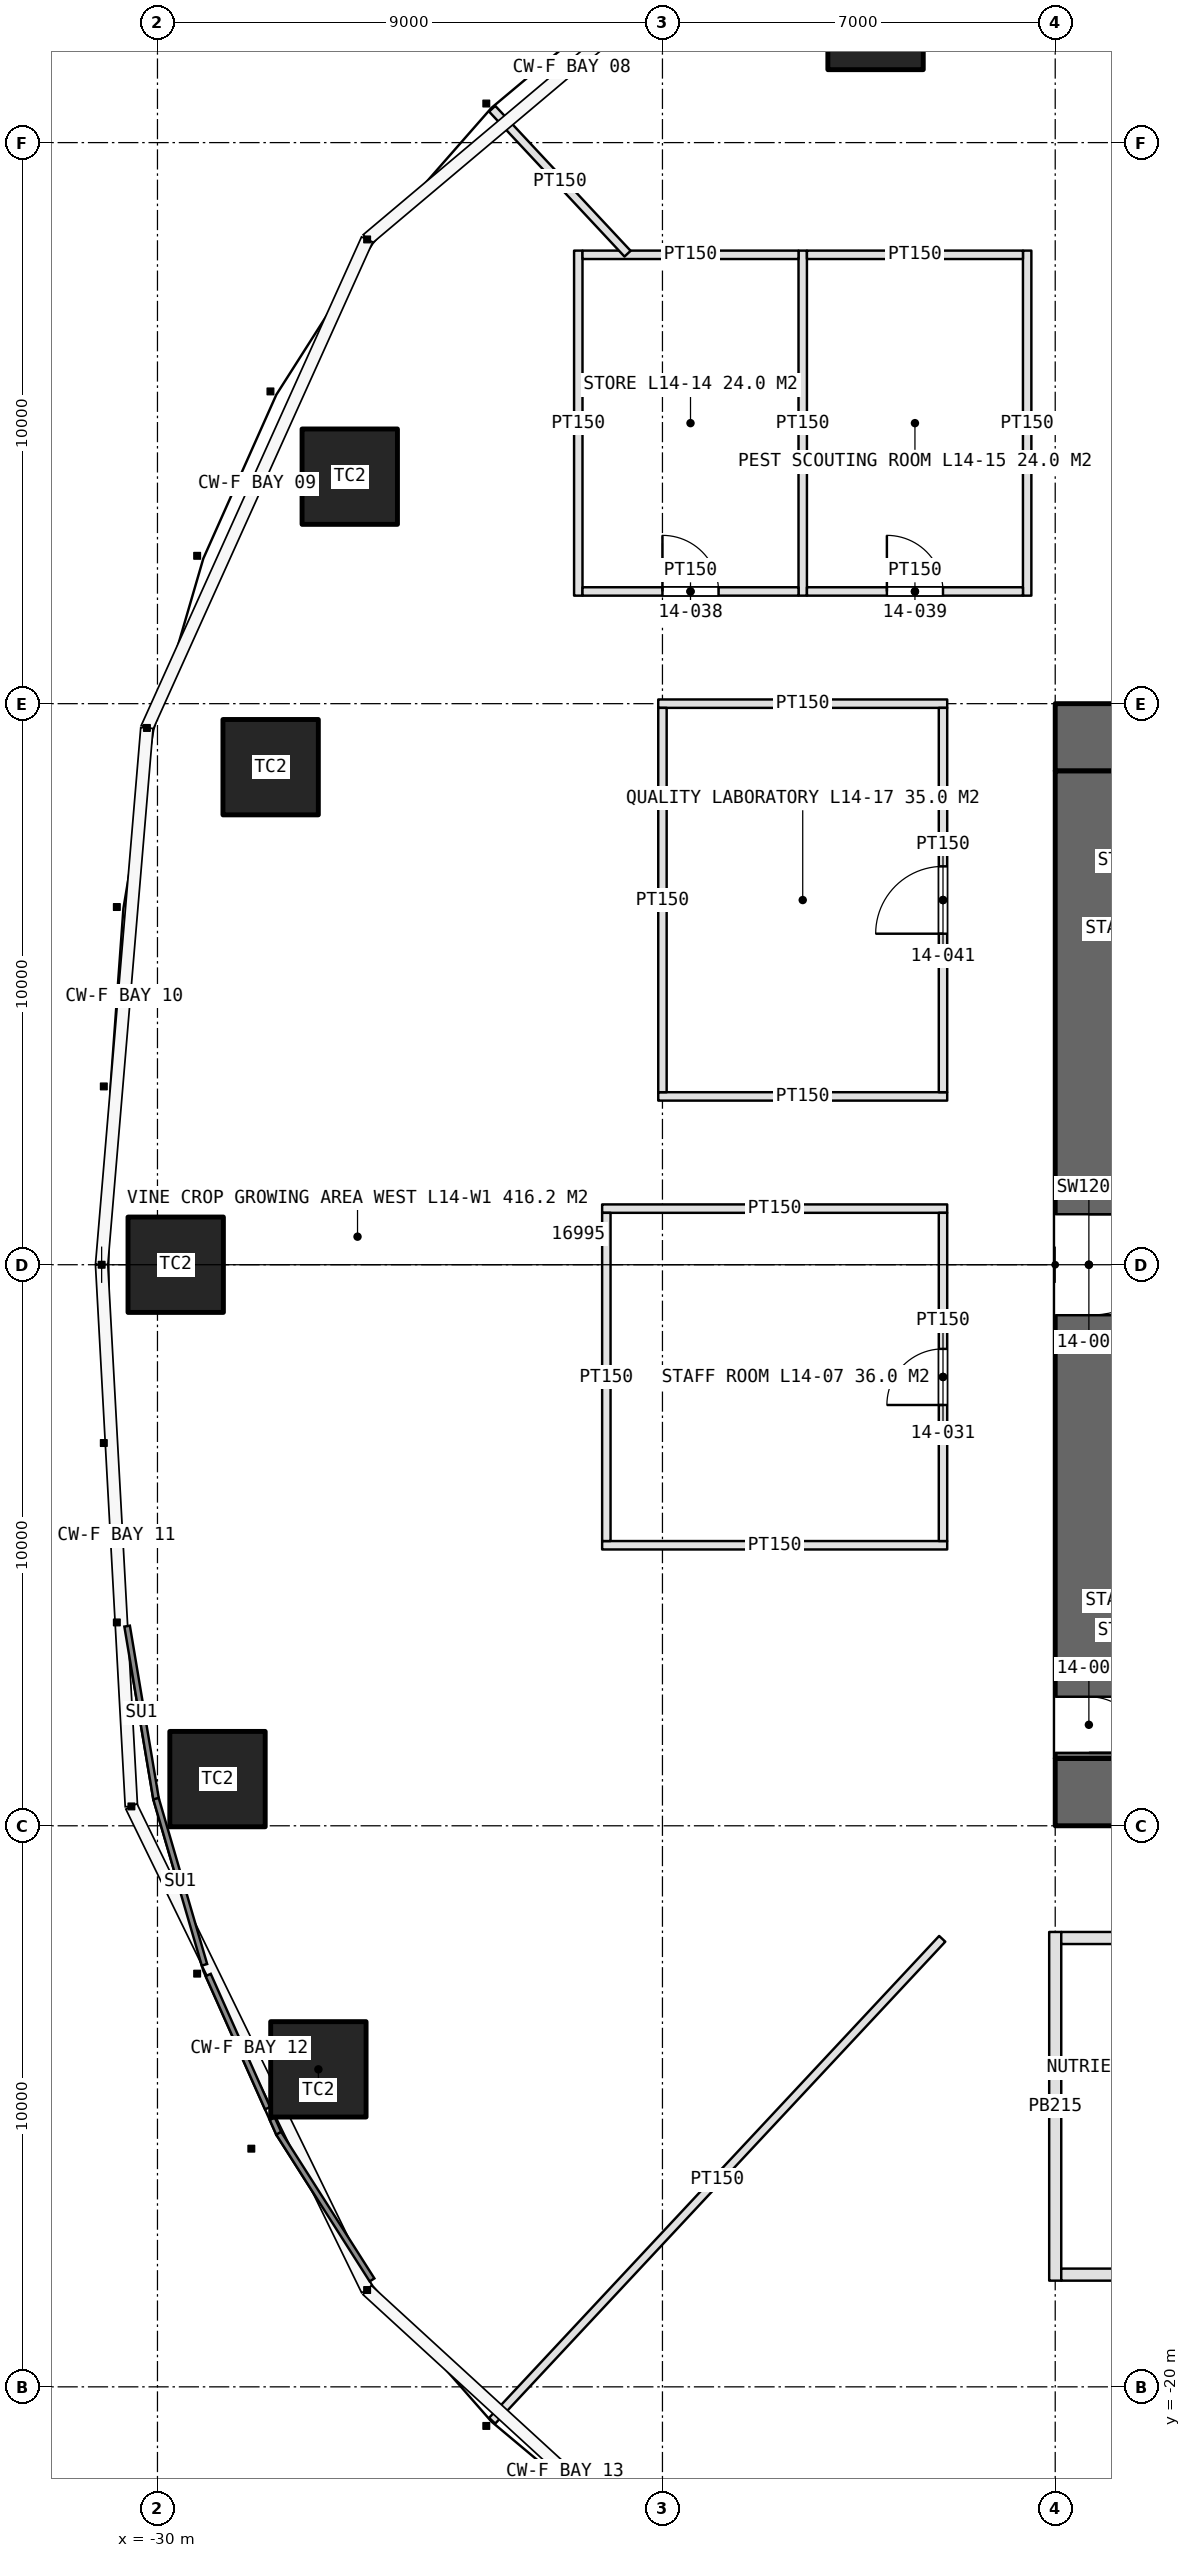
"""IFC4 building model, lengths in metres.
Left out: names, types, materials, properties, quantities, classifications, styles, units other than length and angle.
Written with IfcOpenShell. Run it as: python <this file> out.ifc"""

import sys

from ifc_helpers import new_model, si_unit, direction, frame, frame_2d, origin, origin_2d, place, context, subcontext, project, spatial, rectangle, extrude, element, fill, save


model = new_model("IFC4")
c1 = context("Model", 3, precision=1e-05, world=origin(), true_north=direction((0.0, 1.0)))
c2 = subcontext(c1, "Body", "Model", "MODEL_VIEW")
j1 = project(units=[si_unit("LENGTHUNIT", "METRE"), si_unit("PLANEANGLEUNIT", "RADIAN")], contexts=[c1])
p1 = place(None, origin())
s1 = spatial("IfcSite", under=j1, at=p1, CompositionType="ELEMENT")
p2 = place(p1, origin())
s2 = spatial("IfcBuilding", under=s1, at=p2, CompositionType="ELEMENT")
p3 = place(p2, frame((0.0, 0.0, 70.0)))
s3 = spatial("IfcBuildingStorey", under=s2, at=p3, CompositionType="ELEMENT", Elevation=70.0)
p4 = place(p3, frame((-14.0, -9.4, 0.0), z_axis=(0.0, 0.0, 1.0), x_axis=(1.0, 0.0, 0.0)))
e1 = element("IfcWall", 1, at=p4, inside=s3, PredefinedType="SHEAR", context=c2, shape_type="SweptSolid", body=[
    extrude(rectangle(XDim=28.0, YDim=1.2, at=frame_2d((14.0, 0.0))), origin(), (0.0, 0.0, 1.0), 5.0),
])
p5 = place(p4, frame((13.1, 0.0, 0.0)))
e2 = element("IfcOpeningElement", 2, at=p5, cuts=e1, PredefinedType="OPENING", context=c2, shape_type="SweptSolid", body=[
    extrude(rectangle(XDim=1.8, YDim=2.4, at=frame_2d((0.9, 1.2))), frame((0.0, 0.61, 0.0), z_axis=(0.0, -1.0, 0.0), x_axis=(1.0, 0.0, 0.0)), (0.0, 0.0, 1.0), 1.22),
])
p6 = place(p4, frame((22.9, 0.0, 0.0)))
e3 = element("IfcOpeningElement", 3, at=p6, cuts=e1, PredefinedType="OPENING", context=c2, shape_type="SweptSolid", body=[
    extrude(rectangle(XDim=2.2, YDim=2.7, at=frame_2d((1.1, 1.35))), frame((0.0, 0.61, 0.0), z_axis=(0.0, -1.0, 0.0), x_axis=(1.0, 0.0, 0.0)), (0.0, 0.0, 1.0), 1.22),
])
p7 = place(p3, frame((14.0, 9.4, 0.0), z_axis=(0.0, 0.0, 1.0), x_axis=(-1.0, 0.0, 0.0)))
e4 = element("IfcWall", 4, at=p7, inside=s3, PredefinedType="SHEAR", context=c2, shape_type="SweptSolid", body=[
    extrude(rectangle(XDim=28.0, YDim=1.2, at=frame_2d((14.0, 0.0))), origin(), (0.0, 0.0, 1.0), 5.0),
])
p8 = place(p7, frame((24.0, 0.0, 0.0)))
e5 = element("IfcOpeningElement", 5, at=p8, cuts=e4, PredefinedType="OPENING", context=c2, shape_type="SweptSolid", body=[
    extrude(rectangle(XDim=1.0, YDim=2.4, at=frame_2d((0.5, 1.2))), frame((0.0, 0.61, 0.0), z_axis=(0.0, -1.0, 0.0), x_axis=(1.0, 0.0, 0.0)), (0.0, 0.0, 1.0), 1.22),
])
p9 = place(p7, frame((13.1, 0.0, 0.0)))
e6 = element("IfcOpeningElement", 6, at=p9, cuts=e4, PredefinedType="OPENING", context=c2, shape_type="SweptSolid", body=[
    extrude(rectangle(XDim=1.8, YDim=2.4, at=frame_2d((0.9, 1.2))), frame((0.0, 0.61, 0.0), z_axis=(0.0, -1.0, 0.0), x_axis=(1.0, 0.0, 0.0)), (0.0, 0.0, 1.0), 1.22),
])
p10 = place(p3, frame((-13.4, 8.8, 0.0), z_axis=(0.0, 0.0, 1.0), x_axis=(0.0, -1.0, 0.0)))
e7 = element("IfcWall", 7, at=p10, inside=s3, PredefinedType="SHEAR", context=c2, shape_type="SweptSolid", body=[
    extrude(rectangle(XDim=17.6, YDim=1.2, at=frame_2d((8.8, 0.0))), origin(), (0.0, 0.0, 1.0), 5.0),
])
p11 = place(p10, frame((7.9, 0.0, 0.0)))
e8 = element("IfcOpeningElement", 8, at=p11, cuts=e7, PredefinedType="OPENING", context=c2, shape_type="SweptSolid", body=[
    extrude(rectangle(XDim=1.8, YDim=2.4, at=frame_2d((0.9, 1.2))), frame((0.0, 0.61, 0.0), z_axis=(0.0, -1.0, 0.0), x_axis=(1.0, 0.0, 0.0)), (0.0, 0.0, 1.0), 1.22),
])
p12 = place(p10, frame((16.5, 0.0, 0.0)))
e9 = element("IfcOpeningElement", 9, at=p12, cuts=e7, PredefinedType="OPENING", context=c2, shape_type="SweptSolid", body=[
    extrude(rectangle(XDim=1.0, YDim=2.4, at=frame_2d((0.5, 1.2))), frame((0.0, 0.61, 0.0), z_axis=(0.0, -1.0, 0.0), x_axis=(1.0, 0.0, 0.0)), (0.0, 0.0, 1.0), 1.22),
])
for number, where, z_axis, x_axis in (
    (10, (-17.202, 22.15, 0.0), (0.0, 0.0, 1.0), (1.0, 0.0, 0.0)),
    (11, (-26.573, 14.046, 0.0), (0.0, 0.0, 1.0), (1.0, 0.0, 0.0)),
    (12, (-27.983, 8.868, 0.0), (0.0, 0.0, 1.0), (1.0, 0.0, 0.0)),
    (13, (-29.675, 0.0, 0.0), (0.0, 0.0, 1.0), (1.0, 0.0, 0.0)),
    (14, (-28.93, -9.168, 0.0), (0.0, 0.0, 1.0), (1.0, 0.0, 0.0)),
    (15, (-27.132, -14.341, 0.0), (0.0, 0.0, 1.0), (1.0, 0.0, 0.0)),
):
    element("IfcColumn", number, at=place(p3, frame(where, z_axis=z_axis, x_axis=x_axis)), inside=s3, PredefinedType="COLUMN", context=c2, shape_type="SweptSolid", body=[
        extrude(rectangle(XDim=1.7, YDim=1.7, at=origin_2d()), origin(), (0.0, 0.0, 1.0), 5.0),
    ])
p13 = place(p3, frame((-14.0, -11.893, 0.0), z_axis=(0.0, 0.0, 1.0), x_axis=(0.0, -1.0, 0.0)))
e16 = element("IfcWall", 16, at=p13, inside=s3, PredefinedType="PARTITIONING", context=c2, shape_type="SweptSolid", body=[
    extrude(rectangle(XDim=6.215, YDim=0.215, at=frame_2d((3.107, 0.0))), origin(), (0.0, 0.0, 1.0), 3.6),
])
p14 = place(p3, frame((-13.893, -12.0, 0.0), z_axis=(0.0, 0.0, 1.0), x_axis=(1.0, 0.0, 0.0)))
e17 = element("IfcWall", 17, at=p14, inside=s3, PredefinedType="PARTITIONING", context=c2, shape_type="SweptSolid", body=[
    extrude(rectangle(XDim=5.785, YDim=0.215, at=frame_2d((2.893, 0.0))), origin(), (0.0, 0.0, 1.0), 3.6),
])
p15 = place(p14, frame((1.692, 0.0, 0.0)))
e18 = element("IfcOpeningElement", 18, at=p15, cuts=e17, PredefinedType="OPENING", context=c2, shape_type="SweptSolid", body=[
    extrude(rectangle(XDim=2.4, YDim=2.4, at=frame_2d((1.2, 1.2))), frame((0.0, 0.118, 0.0), z_axis=(0.0, -1.0, 0.0), x_axis=(1.0, 0.0, 0.0)), (0.0, 0.0, 1.0), 0.235),
])
p16 = place(p3, frame((-13.893, -18.0, 0.0), z_axis=(0.0, 0.0, 1.0), x_axis=(1.0, 0.0, 0.0)))
e19 = element("IfcWall", 19, at=p16, inside=s3, PredefinedType="PARTITIONING", context=c2, shape_type="SweptSolid", body=[
    extrude(rectangle(XDim=5.785, YDim=0.215, at=frame_2d((2.893, 0.0))), origin(), (0.0, 0.0, 1.0), 3.6),
])
for number, where, z_axis, x_axis in (
    (20, (-15.925, -5.0, 0.0), (0.0, 0.0, 1.0), (-1.0, 0.0, 0.0)),
    (21, (-15.925, 1.0, 0.0), (0.0, 0.0, 1.0), (-1.0, 0.0, 0.0)),
):
    element("IfcWall", number, at=place(p3, frame(where, z_axis=z_axis, x_axis=x_axis)), inside=s3, PredefinedType="PARTITIONING", context=c2, shape_type="SweptSolid", body=[
        extrude(rectangle(XDim=6.15, YDim=0.15, at=frame_2d((3.075, 0.0))), origin(), (0.0, 0.0, 1.0), 3.6),
    ])
p17 = place(p3, frame((-16.0, -4.925, 0.0), z_axis=(0.0, 0.0, 1.0), x_axis=(0.0, 1.0, 0.0)))
e22 = element("IfcWall", 22, at=p17, inside=s3, PredefinedType="PARTITIONING", context=c2, shape_type="SweptSolid", body=[
    extrude(rectangle(XDim=5.85, YDim=0.15, at=frame_2d((2.925, 0.0))), origin(), (0.0, 0.0, 1.0), 3.6),
])
p18 = place(p17, frame((2.425, 0.0, 0.0)))
e23 = element("IfcOpeningElement", 23, at=p18, cuts=e22, PredefinedType="OPENING", context=c2, shape_type="SweptSolid", body=[
    extrude(rectangle(XDim=1.0, YDim=2.2, at=frame_2d((0.5, 1.1))), frame((0.0, 0.085, 0.0), z_axis=(0.0, -1.0, 0.0), x_axis=(1.0, 0.0, 0.0)), (0.0, 0.0, 1.0), 0.17),
])
p19 = place(p3, frame((-22.0, -4.925, 0.0), z_axis=(0.0, 0.0, 1.0), x_axis=(0.0, 1.0, 0.0)))
e24 = element("IfcWall", 24, at=p19, inside=s3, PredefinedType="PARTITIONING", context=c2, shape_type="SweptSolid", body=[
    extrude(rectangle(XDim=5.85, YDim=0.15, at=frame_2d((2.925, 0.0))), origin(), (0.0, 0.0, 1.0), 3.6),
])
for number, where, z_axis, x_axis in (
    (25, (-22.5, 11.925, 0.0), (0.0, 0.0, 1.0), (0.0, 1.0, 0.0)),
    (26, (-18.5, 11.925, 0.0), (0.0, 0.0, 1.0), (0.0, 1.0, 0.0)),
    (27, (-14.5, 11.925, 0.0), (0.0, 0.0, 1.0), (0.0, 1.0, 0.0)),
):
    element("IfcWall", number, at=place(p3, frame(where, z_axis=z_axis, x_axis=x_axis)), inside=s3, PredefinedType="PARTITIONING", context=c2, shape_type="SweptSolid", body=[
        extrude(rectangle(XDim=6.15, YDim=0.15, at=frame_2d((3.075, 0.0))), origin(), (0.0, 0.0, 1.0), 3.6),
    ])
p20 = place(p3, frame((-22.425, 12.0, 0.0), z_axis=(0.0, 0.0, 1.0), x_axis=(1.0, 0.0, 0.0)))
e28 = element("IfcWall", 28, at=p20, inside=s3, PredefinedType="PARTITIONING", context=c2, shape_type="SweptSolid", body=[
    extrude(rectangle(XDim=3.85, YDim=0.15, at=frame_2d((1.925, 0.0))), origin(), (0.0, 0.0, 1.0), 3.6),
])
p21 = place(p20, frame((1.425, 0.0, 0.0)))
e29 = element("IfcOpeningElement", 29, at=p21, cuts=e28, PredefinedType="OPENING", context=c2, shape_type="SweptSolid", body=[
    extrude(rectangle(XDim=1.0, YDim=2.2, at=frame_2d((0.5, 1.1))), frame((0.0, 0.085, 0.0), z_axis=(0.0, -1.0, 0.0), x_axis=(1.0, 0.0, 0.0)), (0.0, 0.0, 1.0), 0.17),
])
p22 = place(p3, frame((-22.425, 18.0, 0.0), z_axis=(0.0, 0.0, 1.0), x_axis=(1.0, 0.0, 0.0)))
e30 = element("IfcWall", 30, at=p22, inside=s3, PredefinedType="PARTITIONING", context=c2, shape_type="SweptSolid", body=[
    extrude(rectangle(XDim=3.85, YDim=0.15, at=frame_2d((1.925, 0.0))), origin(), (0.0, 0.0, 1.0), 3.6),
])
p23 = place(p3, frame((-18.425, 12.0, 0.0), z_axis=(0.0, 0.0, 1.0), x_axis=(1.0, 0.0, 0.0)))
e31 = element("IfcWall", 31, at=p23, inside=s3, PredefinedType="PARTITIONING", context=c2, shape_type="SweptSolid", body=[
    extrude(rectangle(XDim=3.85, YDim=0.15, at=frame_2d((1.925, 0.0))), origin(), (0.0, 0.0, 1.0), 3.6),
])
p24 = place(p23, frame((1.425, 0.0, 0.0)))
e32 = element("IfcOpeningElement", 32, at=p24, cuts=e31, PredefinedType="OPENING", context=c2, shape_type="SweptSolid", body=[
    extrude(rectangle(XDim=1.0, YDim=2.2, at=frame_2d((0.5, 1.1))), frame((0.0, 0.085, 0.0), z_axis=(0.0, -1.0, 0.0), x_axis=(1.0, 0.0, 0.0)), (0.0, 0.0, 1.0), 0.17),
])
p25 = place(p3, frame((-18.425, 18.0, 0.0), z_axis=(0.0, 0.0, 1.0), x_axis=(1.0, 0.0, 0.0)))
e33 = element("IfcWall", 33, at=p25, inside=s3, PredefinedType="PARTITIONING", context=c2, shape_type="SweptSolid", body=[
    extrude(rectangle(XDim=3.85, YDim=0.15, at=frame_2d((1.925, 0.0))), origin(), (0.0, 0.0, 1.0), 3.6),
])
for number, where, z_axis, x_axis in (
    (34, (-15.925, 3.0, 0.0), (0.0, 0.0, 1.0), (-1.0, 0.0, 0.0)),
    (35, (-15.925, 10.0, 0.0), (0.0, 0.0, 1.0), (-1.0, 0.0, 0.0)),
):
    element("IfcWall", number, at=place(p3, frame(where, z_axis=z_axis, x_axis=x_axis)), inside=s3, PredefinedType="PARTITIONING", context=c2, shape_type="SweptSolid", body=[
        extrude(rectangle(XDim=5.15, YDim=0.15, at=frame_2d((2.575, 0.0))), origin(), (0.0, 0.0, 1.0), 3.6),
    ])
p26 = place(p3, frame((-16.0, 3.075, 0.0), z_axis=(0.0, 0.0, 1.0), x_axis=(0.0, 1.0, 0.0)))
e36 = element("IfcWall", 36, at=p26, inside=s3, PredefinedType="PARTITIONING", context=c2, shape_type="SweptSolid", body=[
    extrude(rectangle(XDim=6.85, YDim=0.15, at=frame_2d((3.425, 0.0))), origin(), (0.0, 0.0, 1.0), 3.6),
])
p27 = place(p26, frame((2.825, 0.0, 0.0)))
e37 = element("IfcOpeningElement", 37, at=p27, cuts=e36, PredefinedType="OPENING", context=c2, shape_type="SweptSolid", body=[
    extrude(rectangle(XDim=1.2, YDim=2.3, at=frame_2d((0.6, 1.15))), frame((0.0, 0.085, 0.0), z_axis=(0.0, -1.0, 0.0), x_axis=(1.0, 0.0, 0.0)), (0.0, 0.0, 1.0), 0.17),
])
p28 = place(p3, frame((-21.0, 3.075, 0.0), z_axis=(0.0, 0.0, 1.0), x_axis=(0.0, 1.0, 0.0)))
e38 = element("IfcWall", 38, at=p28, inside=s3, PredefinedType="PARTITIONING", context=c2, shape_type="SweptSolid", body=[
    extrude(rectangle(XDim=6.85, YDim=0.15, at=frame_2d((3.425, 0.0))), origin(), (0.0, 0.0, 1.0), 3.6),
])
p29 = place(p3, frame((-16.014, -12.015, 0.0), z_axis=(0.0, 0.0, 1.0), x_axis=(-0.682522513656, -0.730864569091, 0.0)))
e39 = element("IfcWall", 39, at=p29, inside=s3, PredefinedType="PARTITIONING", context=c2, shape_type="SweptSolid", body=[
    extrude(rectangle(XDim=11.752, YDim=0.15, at=frame_2d((5.876, 0.0))), origin(), (0.0, 0.0, 1.0), 3.6),
])
p30 = place(p3, frame((-21.622, 18.02, 0.0), z_axis=(0.0, 0.0, 1.0), x_axis=(-0.682522451791, 0.730864626864, 0.0)))
e40 = element("IfcWall", 40, at=p30, inside=s3, PredefinedType="PARTITIONING", context=c2, shape_type="SweptSolid", body=[
    extrude(rectangle(XDim=3.535, YDim=0.15, at=frame_2d((1.768, 0.0))), origin(), (0.0, 0.0, 1.0), 3.6),
])
p31 = place(p11, origin())
e41 = element("IfcDoor", 41, at=p31, inside=s3, OperationType="DOUBLE_DOOR_SINGLE_SWING", PredefinedType="DOOR", context=c2, shape_type="SweptSolid", body=[
    extrude(rectangle(XDim=1.8, YDim=2.4, at=frame_2d((0.9, 1.2))), frame((0.0, 0.025, 0.0), z_axis=(0.0, -1.0, 0.0), x_axis=(1.0, 0.0, 0.0)), (0.0, 0.0, 1.0), 0.05),
])
fill(e8, e41)
p32 = place(p12, origin())
e42 = element("IfcDoor", 42, at=p32, inside=s3, OperationType="SINGLE_SWING_RIGHT", PredefinedType="DOOR", context=c2, shape_type="SweptSolid", body=[
    extrude(rectangle(XDim=1.0, YDim=2.4, at=frame_2d((0.5, 1.2))), frame((0.0, 0.025, 0.0), z_axis=(0.0, -1.0, 0.0), x_axis=(1.0, 0.0, 0.0)), (0.0, 0.0, 1.0), 0.05),
])
fill(e9, e42)
p33 = place(p18, origin())
e43 = element("IfcDoor", 43, at=p33, inside=s3, OperationType="SINGLE_SWING_LEFT", PredefinedType="DOOR", context=c2, shape_type="SweptSolid", body=[
    extrude(rectangle(XDim=1.0, YDim=2.2, at=frame_2d((0.5, 1.1))), frame((0.0, 0.025, 0.0), z_axis=(0.0, -1.0, 0.0), x_axis=(1.0, 0.0, 0.0)), (0.0, 0.0, 1.0), 0.05),
])
fill(e23, e43)
p34 = place(p21, origin())
e44 = element("IfcDoor", 44, at=p34, inside=s3, OperationType="SINGLE_SWING_LEFT", PredefinedType="DOOR", context=c2, shape_type="SweptSolid", body=[
    extrude(rectangle(XDim=1.0, YDim=2.2, at=frame_2d((0.5, 1.1))), frame((0.0, 0.025, 0.0), z_axis=(0.0, -1.0, 0.0), x_axis=(1.0, 0.0, 0.0)), (0.0, 0.0, 1.0), 0.05),
])
fill(e29, e44)
p35 = place(p24, origin())
e45 = element("IfcDoor", 45, at=p35, inside=s3, OperationType="SINGLE_SWING_LEFT", PredefinedType="DOOR", context=c2, shape_type="SweptSolid", body=[
    extrude(rectangle(XDim=1.0, YDim=2.2, at=frame_2d((0.5, 1.1))), frame((0.0, 0.025, 0.0), z_axis=(0.0, -1.0, 0.0), x_axis=(1.0, 0.0, 0.0)), (0.0, 0.0, 1.0), 0.05),
])
fill(e32, e45)
p36 = place(p27, origin())
e46 = element("IfcDoor", 46, at=p36, inside=s3, OperationType="SINGLE_SWING_LEFT", PredefinedType="DOOR", context=c2, shape_type="SweptSolid", body=[
    extrude(rectangle(XDim=1.2, YDim=2.3, at=frame_2d((0.6, 1.15))), frame((0.0, 0.025, 0.0), z_axis=(0.0, -1.0, 0.0), x_axis=(1.0, 0.0, 0.0)), (0.0, 0.0, 1.0), 0.05),
])
fill(e37, e46)
save(model, sys.argv[1])
